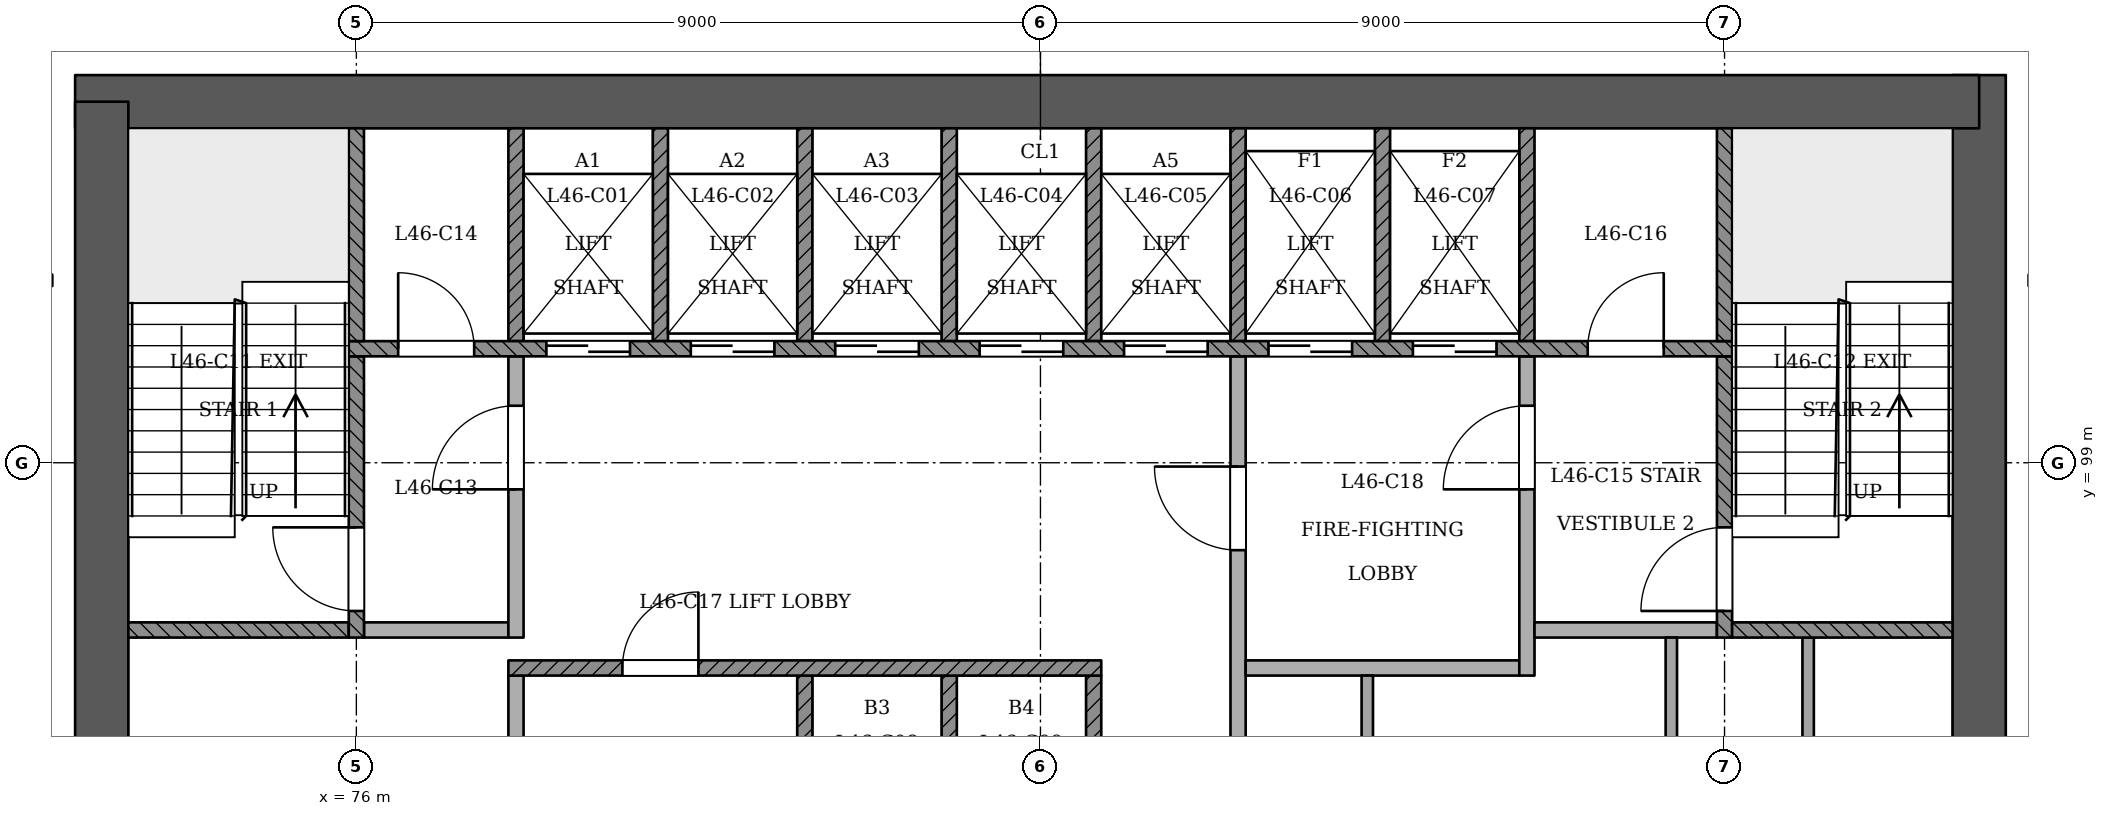
"""IFC4 building model, lengths in metres.
Left out: names, types, materials, properties, quantities, classifications, styles, units other than length and angle.
Written with IfcOpenShell. Run it as: python <this file> out.ifc"""

import sys

from ifc_helpers import new_model, si_unit, direction, frame, frame_2d, origin, place, context, subcontext, project, spatial, rectangle, extrude, element, fill, save


model = new_model("IFC4")
c1 = context("Model", 3, precision=1e-05, world=origin(), true_north=direction((0.0, 1.0)))
c2 = subcontext(c1, "Body", "Model", "MODEL_VIEW")
j1 = project(units=[si_unit("LENGTHUNIT", "METRE"), si_unit("PLANEANGLEUNIT", "RADIAN")], contexts=[c1])
p1 = place(None, origin())
s1 = spatial("IfcSite", under=j1, at=p1, CompositionType="ELEMENT")
p2 = place(p1, origin())
s2 = spatial("IfcBuilding", under=s1, at=p2, CompositionType="ELEMENT")
p3 = place(p2, frame((0.0, 0.0, 178.2)))
s3 = spatial("IfcBuildingStorey", under=s2, at=p3, CompositionType="ELEMENT", Elevation=178.2)
p4 = place(p3, frame((97.35, 93.05, 0.0), z_axis=(0.0, 0.0, 1.0), x_axis=(0.0, 1.0, 0.0)))
e1 = element("IfcWall", 1, at=p4, inside=s3, PredefinedType="SHEAR", context=c2, shape_type="SweptSolid", body=[
    extrude(rectangle(XDim=11.05, YDim=0.7, at=frame_2d((5.525, 0.0))), origin(), (0.0, 0.0, 1.0), 3.6),
])
p5 = place(p3, frame((97.35, 103.75, 0.0), z_axis=(0.0, 0.0, 1.0), x_axis=(-1.0, 0.0, 0.0)))
e2 = element("IfcWall", 2, at=p5, inside=s3, PredefinedType="SHEAR", context=c2, shape_type="SweptSolid", body=[
    extrude(rectangle(XDim=25.05, YDim=0.7, at=frame_2d((12.525, 0.0))), origin(), (0.0, 0.0, 1.0), 3.6),
])
p6 = place(p3, frame((72.65, 103.75, 0.0), z_axis=(0.0, 0.0, 1.0), x_axis=(0.0, -1.0, 0.0)))
e3 = element("IfcWall", 3, at=p6, inside=s3, PredefinedType="SHEAR", context=c2, shape_type="SweptSolid", body=[
    extrude(rectangle(XDim=11.05, YDim=0.7, at=frame_2d((5.525, 0.0))), origin(), (0.0, 0.0, 1.0), 3.6),
])
p7 = place(p3, frame((78.1, 93.4, 0.0), z_axis=(0.0, 0.0, 1.0), x_axis=(0.0, 1.0, 0.0)))
e4 = element("IfcWall", 4, at=p7, inside=s3, PredefinedType="PARTITIONING", context=c2, shape_type="SweptSolid", body=[
    extrude(rectangle(XDim=2.8, YDim=0.2, at=frame_2d((1.4, 0.0))), origin(), (0.0, 0.0, 1.0), 3.15),
])
for number, where, z_axis, x_axis in (
    (5, (81.9, 93.4, 0.0), (0.0, 0.0, 1.0), (0.0, 1.0, 0.0)),
    (6, (83.8, 93.4, 0.0), (0.0, 0.0, 1.0), (0.0, 1.0, 0.0)),
    (7, (85.7, 93.4, 0.0), (0.0, 0.0, 1.0), (0.0, 1.0, 0.0)),
):
    element("IfcWall", number, at=place(p3, frame(where, z_axis=z_axis, x_axis=x_axis)), inside=s3, PredefinedType="SOLIDWALL", context=c2, shape_type="SweptSolid", body=[
        extrude(rectangle(XDim=2.8, YDim=0.2, at=frame_2d((1.4, 0.0))), origin(), (0.0, 0.0, 1.0), 3.15),
    ])
p8 = place(p3, frame((87.6, 93.4, 0.0), z_axis=(0.0, 0.0, 1.0), x_axis=(0.0, 1.0, 0.0)))
e8 = element("IfcWall", 8, at=p8, inside=s3, PredefinedType="PARTITIONING", context=c2, shape_type="SweptSolid", body=[
    extrude(rectangle(XDim=7.0, YDim=0.2, at=frame_2d((3.5, 0.0))), origin(), (0.0, 0.0, 1.0), 3.15),
])
p9 = place(p8, frame((4.45, 0.0, 0.0)))
e9 = element("IfcOpeningElement", 9, at=p9, cuts=e8, PredefinedType="OPENING", context=c2, shape_type="SweptSolid", body=[
    extrude(rectangle(XDim=1.1, YDim=2.1, at=frame_2d((0.55, 1.05))), frame((0.0, 0.11, 0.0), z_axis=(0.0, -1.0, 0.0), x_axis=(1.0, 0.0, 0.0)), (0.0, 0.0, 1.0), 0.221),
])
p10 = place(p3, frame((89.3, 93.4, 0.0), z_axis=(0.0, 0.0, 1.0), x_axis=(0.0, 1.0, 0.0)))
e10 = element("IfcWall", 10, at=p10, inside=s3, PredefinedType="PARTITIONING", context=c2, shape_type="SweptSolid", body=[
    extrude(rectangle(XDim=2.8, YDim=0.15, at=frame_2d((1.4, 0.0))), origin(), (0.0, 0.0, 1.0), 3.15),
])
for number, where, z_axis, x_axis in (
    (11, (93.3, 93.4, 0.0), (0.0, 0.0, 1.0), (0.0, 1.0, 0.0)),
    (12, (95.1, 93.4, 0.0), (0.0, 0.0, 1.0), (0.0, 1.0, 0.0)),
):
    element("IfcWall", number, at=place(p3, frame(where, z_axis=z_axis, x_axis=x_axis)), inside=s3, PredefinedType="PARTITIONING", context=c2, shape_type="SweptSolid", body=[
        extrude(rectangle(XDim=3.3, YDim=0.15, at=frame_2d((1.65, 0.0))), origin(), (0.0, 0.0, 1.0), 3.15),
    ])
p11 = place(p3, frame((78.0, 96.3, 0.0), z_axis=(0.0, 0.0, 1.0), x_axis=(1.0, 0.0, 0.0)))
e13 = element("IfcWall", 13, at=p11, inside=s3, PredefinedType="SOLIDWALL", context=c2, shape_type="SweptSolid", body=[
    extrude(rectangle(XDim=7.8, YDim=0.2, at=frame_2d((3.9, 0.0))), origin(), (0.0, 0.0, 1.0), 3.15),
])
p12 = place(p11, frame((1.5, 0.0, 0.0)))
e14 = element("IfcOpeningElement", 14, at=p12, cuts=e13, PredefinedType="OPENING", context=c2, shape_type="SweptSolid", body=[
    extrude(rectangle(XDim=1.0, YDim=2.1, at=frame_2d((0.5, 1.05))), frame((0.0, 0.11, 0.0), z_axis=(0.0, -1.0, 0.0), x_axis=(1.0, 0.0, 0.0)), (0.0, 0.0, 1.0), 0.221),
])
p13 = place(p3, frame((87.7, 96.3, 0.0), z_axis=(0.0, 0.0, 1.0), x_axis=(1.0, 0.0, 0.0)))
e15 = element("IfcWall", 15, at=p13, inside=s3, PredefinedType="PARTITIONING", context=c2, shape_type="SweptSolid", body=[
    extrude(rectangle(XDim=3.6, YDim=0.2, at=frame_2d((1.8, 0.0))), origin(), (0.0, 0.0, 1.0), 3.15),
])
p14 = place(p3, frame((91.4, 96.2, 0.0), z_axis=(0.0, 0.0, 1.0), x_axis=(0.0, 1.0, 0.0)))
e16 = element("IfcWall", 16, at=p14, inside=s3, PredefinedType="PARTITIONING", context=c2, shape_type="SweptSolid", body=[
    extrude(rectangle(XDim=4.2, YDim=0.2, at=frame_2d((2.1, 0.0))), origin(), (0.0, 0.0, 1.0), 3.15),
])
p15 = place(p14, frame((2.45, 0.0, 0.0)))
e17 = element("IfcOpeningElement", 17, at=p15, cuts=e16, PredefinedType="OPENING", context=c2, shape_type="SweptSolid", body=[
    extrude(rectangle(XDim=1.1, YDim=2.1, at=frame_2d((0.55, 1.05))), frame((0.0, 0.11, 0.0), z_axis=(0.0, -1.0, 0.0), x_axis=(1.0, 0.0, 0.0)), (0.0, 0.0, 1.0), 0.221),
])
p16 = place(p3, frame((73.0, 96.8, 0.0), z_axis=(0.0, 0.0, 1.0), x_axis=(1.0, 0.0, 0.0)))
e18 = element("IfcWall", 18, at=p16, inside=s3, PredefinedType="SOLIDWALL", context=c2, shape_type="SweptSolid", body=[
    extrude(rectangle(XDim=2.9, YDim=0.2, at=frame_2d((1.45, 0.0))), origin(), (0.0, 0.0, 1.0), 3.15),
])
p17 = place(p3, frame((76.0, 96.7, 0.0), z_axis=(0.0, 0.0, 1.0), x_axis=(0.0, 1.0, 0.0)))
e19 = element("IfcWall", 19, at=p17, inside=s3, PredefinedType="SOLIDWALL", context=c2, shape_type="SweptSolid", body=[
    extrude(rectangle(XDim=3.7, YDim=0.2, at=frame_2d((1.85, 0.0))), origin(), (0.0, 0.0, 1.0), 3.15),
])
p18 = place(p17, frame((0.35, 0.0, 0.0)))
e20 = element("IfcOpeningElement", 20, at=p18, cuts=e19, PredefinedType="OPENING", context=c2, shape_type="SweptSolid", body=[
    extrude(rectangle(XDim=1.1, YDim=2.1, at=frame_2d((0.55, 1.05))), frame((0.0, 0.11, 0.0), z_axis=(0.0, -1.0, 0.0), x_axis=(1.0, 0.0, 0.0)), (0.0, 0.0, 1.0), 0.221),
])
p19 = place(p3, frame((76.1, 96.8, 0.0), z_axis=(0.0, 0.0, 1.0), x_axis=(1.0, 0.0, 0.0)))
e21 = element("IfcWall", 21, at=p19, inside=s3, PredefinedType="PARTITIONING", context=c2, shape_type="SweptSolid", body=[
    extrude(rectangle(XDim=1.9, YDim=0.2, at=frame_2d((0.95, 0.0))), origin(), (0.0, 0.0, 1.0), 3.15),
])
p20 = place(p3, frame((78.1, 96.7, 0.0), z_axis=(0.0, 0.0, 1.0), x_axis=(0.0, 1.0, 0.0)))
e22 = element("IfcWall", 22, at=p20, inside=s3, PredefinedType="PARTITIONING", context=c2, shape_type="SweptSolid", body=[
    extrude(rectangle(XDim=3.7, YDim=0.2, at=frame_2d((1.85, 0.0))), origin(), (0.0, 0.0, 1.0), 3.15),
])
p21 = place(p20, frame((1.95, 0.0, 0.0)))
e23 = element("IfcOpeningElement", 23, at=p21, cuts=e22, PredefinedType="OPENING", context=c2, shape_type="SweptSolid", body=[
    extrude(rectangle(XDim=1.1, YDim=2.1, at=frame_2d((0.55, 1.05))), frame((0.0, 0.11, 0.0), z_axis=(0.0, -1.0, 0.0), x_axis=(1.0, 0.0, 0.0)), (0.0, 0.0, 1.0), 0.221),
])
p22 = place(p3, frame((91.5, 96.8, 0.0), z_axis=(0.0, 0.0, 1.0), x_axis=(1.0, 0.0, 0.0)))
e24 = element("IfcWall", 24, at=p22, inside=s3, PredefinedType="PARTITIONING", context=c2, shape_type="SweptSolid", body=[
    extrude(rectangle(XDim=2.4, YDim=0.2, at=frame_2d((1.2, 0.0))), origin(), (0.0, 0.0, 1.0), 3.15),
])
p23 = place(p3, frame((94.0, 96.7, 0.0), z_axis=(0.0, 0.0, 1.0), x_axis=(0.0, 1.0, 0.0)))
e25 = element("IfcWall", 25, at=p23, inside=s3, PredefinedType="SOLIDWALL", context=c2, shape_type="SweptSolid", body=[
    extrude(rectangle(XDim=3.7, YDim=0.2, at=frame_2d((1.85, 0.0))), origin(), (0.0, 0.0, 1.0), 3.15),
])
p24 = place(p23, frame((0.35, 0.0, 0.0)))
e26 = element("IfcOpeningElement", 26, at=p24, cuts=e25, PredefinedType="OPENING", context=c2, shape_type="SweptSolid", body=[
    extrude(rectangle(XDim=1.1, YDim=2.1, at=frame_2d((0.55, 1.05))), frame((0.0, 0.11, 0.0), z_axis=(0.0, -1.0, 0.0), x_axis=(1.0, 0.0, 0.0)), (0.0, 0.0, 1.0), 0.221),
])
p25 = place(p3, frame((94.1, 96.8, 0.0), z_axis=(0.0, 0.0, 1.0), x_axis=(1.0, 0.0, 0.0)))
e27 = element("IfcWall", 27, at=p25, inside=s3, PredefinedType="SOLIDWALL", context=c2, shape_type="SweptSolid", body=[
    extrude(rectangle(XDim=2.9, YDim=0.2, at=frame_2d((1.45, 0.0))), origin(), (0.0, 0.0, 1.0), 3.15),
])
p26 = place(p3, frame((75.9, 100.5, 0.0), z_axis=(0.0, 0.0, 1.0), x_axis=(1.0, 0.0, 0.0)))
e28 = element("IfcWall", 28, at=p26, inside=s3, PredefinedType="SOLIDWALL", context=c2, shape_type="SweptSolid", body=[
    extrude(rectangle(XDim=18.2, YDim=0.2, at=frame_2d((9.1, 0.0))), origin(), (0.0, 0.0, 1.0), 3.15),
])
p27 = place(p26, frame((2.6, 0.0, 0.0)))
e29 = element("IfcOpeningElement", 29, at=p27, cuts=e28, PredefinedType="OPENING", context=c2, shape_type="SweptSolid", body=[
    extrude(rectangle(XDim=1.1, YDim=2.1, at=frame_2d((0.55, 1.05))), frame((0.0, 0.11, 0.0), z_axis=(0.0, -1.0, 0.0), x_axis=(1.0, 0.0, 0.0)), (0.0, 0.0, 1.0), 0.221),
])
p28 = place(p26, frame((4.5, 0.0, 0.0)))
e30 = element("IfcOpeningElement", 30, at=p28, cuts=e28, PredefinedType="OPENING", context=c2, shape_type="SweptSolid", body=[
    extrude(rectangle(XDim=1.1, YDim=2.1, at=frame_2d((0.55, 1.05))), frame((0.0, 0.11, 0.0), z_axis=(0.0, -1.0, 0.0), x_axis=(1.0, 0.0, 0.0)), (0.0, 0.0, 1.0), 0.221),
])
p29 = place(p26, frame((6.4, 0.0, 0.0)))
e31 = element("IfcOpeningElement", 31, at=p29, cuts=e28, PredefinedType="OPENING", context=c2, shape_type="SweptSolid", body=[
    extrude(rectangle(XDim=1.1, YDim=2.1, at=frame_2d((0.55, 1.05))), frame((0.0, 0.11, 0.0), z_axis=(0.0, -1.0, 0.0), x_axis=(1.0, 0.0, 0.0)), (0.0, 0.0, 1.0), 0.221),
])
p30 = place(p26, frame((8.3, 0.0, 0.0)))
e32 = element("IfcOpeningElement", 32, at=p30, cuts=e28, PredefinedType="OPENING", context=c2, shape_type="SweptSolid", body=[
    extrude(rectangle(XDim=1.1, YDim=2.1, at=frame_2d((0.55, 1.05))), frame((0.0, 0.11, 0.0), z_axis=(0.0, -1.0, 0.0), x_axis=(1.0, 0.0, 0.0)), (0.0, 0.0, 1.0), 0.221),
])
p31 = place(p26, frame((10.2, 0.0, 0.0)))
e33 = element("IfcOpeningElement", 33, at=p31, cuts=e28, PredefinedType="OPENING", context=c2, shape_type="SweptSolid", body=[
    extrude(rectangle(XDim=1.1, YDim=2.1, at=frame_2d((0.55, 1.05))), frame((0.0, 0.11, 0.0), z_axis=(0.0, -1.0, 0.0), x_axis=(1.0, 0.0, 0.0)), (0.0, 0.0, 1.0), 0.221),
])
p32 = place(p26, frame((12.1, 0.0, 0.0)))
e34 = element("IfcOpeningElement", 34, at=p32, cuts=e28, PredefinedType="OPENING", context=c2, shape_type="SweptSolid", body=[
    extrude(rectangle(XDim=1.1, YDim=2.1, at=frame_2d((0.55, 1.05))), frame((0.0, 0.11, 0.0), z_axis=(0.0, -1.0, 0.0), x_axis=(1.0, 0.0, 0.0)), (0.0, 0.0, 1.0), 0.221),
])
p33 = place(p26, frame((14.0, 0.0, 0.0)))
e35 = element("IfcOpeningElement", 35, at=p33, cuts=e28, PredefinedType="OPENING", context=c2, shape_type="SweptSolid", body=[
    extrude(rectangle(XDim=1.1, YDim=2.1, at=frame_2d((0.55, 1.05))), frame((0.0, 0.11, 0.0), z_axis=(0.0, -1.0, 0.0), x_axis=(1.0, 0.0, 0.0)), (0.0, 0.0, 1.0), 0.221),
])
p34 = place(p26, frame((0.65, 0.0, 0.0)))
e36 = element("IfcOpeningElement", 36, at=p34, cuts=e28, PredefinedType="OPENING", context=c2, shape_type="SweptSolid", body=[
    extrude(rectangle(XDim=1.0, YDim=2.1, at=frame_2d((0.5, 1.05))), frame((0.0, 0.11, 0.0), z_axis=(0.0, -1.0, 0.0), x_axis=(1.0, 0.0, 0.0)), (0.0, 0.0, 1.0), 0.221),
])
p35 = place(p26, frame((16.3, 0.0, 0.0)))
e37 = element("IfcOpeningElement", 37, at=p35, cuts=e28, PredefinedType="OPENING", context=c2, shape_type="SweptSolid", body=[
    extrude(rectangle(XDim=1.0, YDim=2.1, at=frame_2d((0.5, 1.05))), frame((0.0, 0.11, 0.0), z_axis=(0.0, -1.0, 0.0), x_axis=(1.0, 0.0, 0.0)), (0.0, 0.0, 1.0), 0.221),
])
for number, where, z_axis, x_axis in (
    (38, (76.0, 100.6, 0.0), (0.0, 0.0, 1.0), (0.0, 1.0, 0.0)),
    (39, (78.1, 100.6, 0.0), (0.0, 0.0, 1.0), (0.0, 1.0, 0.0)),
    (40, (80.0, 100.6, 0.0), (0.0, 0.0, 1.0), (0.0, 1.0, 0.0)),
    (41, (81.9, 100.6, 0.0), (0.0, 0.0, 1.0), (0.0, 1.0, 0.0)),
    (42, (83.8, 100.6, 0.0), (0.0, 0.0, 1.0), (0.0, 1.0, 0.0)),
    (43, (85.7, 100.6, 0.0), (0.0, 0.0, 1.0), (0.0, 1.0, 0.0)),
    (44, (87.6, 100.6, 0.0), (0.0, 0.0, 1.0), (0.0, 1.0, 0.0)),
    (45, (89.5, 100.6, 0.0), (0.0, 0.0, 1.0), (0.0, 1.0, 0.0)),
    (46, (91.4, 100.6, 0.0), (0.0, 0.0, 1.0), (0.0, 1.0, 0.0)),
    (47, (94.0, 100.6, 0.0), (0.0, 0.0, 1.0), (0.0, 1.0, 0.0)),
):
    element("IfcWall", number, at=place(p3, frame(where, z_axis=z_axis, x_axis=x_axis)), inside=s3, PredefinedType="SOLIDWALL", context=c2, shape_type="SweptSolid", body=[
        extrude(rectangle(XDim=2.8, YDim=0.2, at=frame_2d((1.4, 0.0))), origin(), (0.0, 0.0, 1.0), 3.15),
    ])
p36 = place(p27, origin())
e48 = element("IfcDoor", 48, at=p36, inside=s3, OperationType="SLIDING_TO_RIGHT", PredefinedType="NOTDEFINED", context=c2, shape_type="SweptSolid", body=[
    extrude(rectangle(XDim=1.1, YDim=2.1, at=frame_2d((0.55, 1.05))), frame((0.0, 0.025, 0.0), z_axis=(0.0, -1.0, 0.0), x_axis=(1.0, 0.0, 0.0)), (0.0, 0.0, 1.0), 0.05),
])
fill(e29, e48)
p37 = place(p28, origin())
e49 = element("IfcDoor", 49, at=p37, inside=s3, OperationType="SLIDING_TO_LEFT", PredefinedType="NOTDEFINED", context=c2, shape_type="SweptSolid", body=[
    extrude(rectangle(XDim=1.1, YDim=2.1, at=frame_2d((0.55, 1.05))), frame((0.0, 0.025, 0.0), z_axis=(0.0, -1.0, 0.0), x_axis=(1.0, 0.0, 0.0)), (0.0, 0.0, 1.0), 0.05),
])
fill(e30, e49)
p38 = place(p29, origin())
e50 = element("IfcDoor", 50, at=p38, inside=s3, OperationType="SLIDING_TO_RIGHT", PredefinedType="NOTDEFINED", context=c2, shape_type="SweptSolid", body=[
    extrude(rectangle(XDim=1.1, YDim=2.1, at=frame_2d((0.55, 1.05))), frame((0.0, 0.025, 0.0), z_axis=(0.0, -1.0, 0.0), x_axis=(1.0, 0.0, 0.0)), (0.0, 0.0, 1.0), 0.05),
])
fill(e31, e50)
p39 = place(p30, origin())
e51 = element("IfcDoor", 51, at=p39, inside=s3, OperationType="SLIDING_TO_LEFT", PredefinedType="NOTDEFINED", context=c2, shape_type="SweptSolid", body=[
    extrude(rectangle(XDim=1.1, YDim=2.1, at=frame_2d((0.55, 1.05))), frame((0.0, 0.025, 0.0), z_axis=(0.0, -1.0, 0.0), x_axis=(1.0, 0.0, 0.0)), (0.0, 0.0, 1.0), 0.05),
])
fill(e32, e51)
p40 = place(p31, origin())
e52 = element("IfcDoor", 52, at=p40, inside=s3, OperationType="SLIDING_TO_RIGHT", PredefinedType="NOTDEFINED", context=c2, shape_type="SweptSolid", body=[
    extrude(rectangle(XDim=1.1, YDim=2.1, at=frame_2d((0.55, 1.05))), frame((0.0, 0.025, 0.0), z_axis=(0.0, -1.0, 0.0), x_axis=(1.0, 0.0, 0.0)), (0.0, 0.0, 1.0), 0.05),
])
fill(e33, e52)
p41 = place(p32, origin())
e53 = element("IfcDoor", 53, at=p41, inside=s3, OperationType="SLIDING_TO_RIGHT", PredefinedType="NOTDEFINED", context=c2, shape_type="SweptSolid", body=[
    extrude(rectangle(XDim=1.1, YDim=2.1, at=frame_2d((0.55, 1.05))), frame((0.0, 0.025, 0.0), z_axis=(0.0, -1.0, 0.0), x_axis=(1.0, 0.0, 0.0)), (0.0, 0.0, 1.0), 0.05),
])
fill(e34, e53)
p42 = place(p33, origin())
e54 = element("IfcDoor", 54, at=p42, inside=s3, OperationType="SLIDING_TO_LEFT", PredefinedType="NOTDEFINED", context=c2, shape_type="SweptSolid", body=[
    extrude(rectangle(XDim=1.1, YDim=2.1, at=frame_2d((0.55, 1.05))), frame((0.0, 0.025, 0.0), z_axis=(0.0, -1.0, 0.0), x_axis=(1.0, 0.0, 0.0)), (0.0, 0.0, 1.0), 0.05),
])
fill(e35, e54)
p43 = place(p18, origin())
e55 = element("IfcDoor", 55, at=p43, inside=s3, OperationType="SINGLE_SWING_RIGHT", PredefinedType="NOTDEFINED", context=c2, shape_type="SweptSolid", body=[
    extrude(rectangle(XDim=1.1, YDim=2.1, at=frame_2d((0.55, 1.05))), frame((0.0, 0.025, 0.0), z_axis=(0.0, -1.0, 0.0), x_axis=(1.0, 0.0, 0.0)), (0.0, 0.0, 1.0), 0.05),
])
fill(e20, e55)
p44 = place(p24, origin())
e56 = element("IfcDoor", 56, at=p44, inside=s3, OperationType="SINGLE_SWING_LEFT", PredefinedType="NOTDEFINED", context=c2, shape_type="SweptSolid", body=[
    extrude(rectangle(XDim=1.1, YDim=2.1, at=frame_2d((0.55, 1.05))), frame((0.0, 0.025, 0.0), z_axis=(0.0, -1.0, 0.0), x_axis=(1.0, 0.0, 0.0)), (0.0, 0.0, 1.0), 0.05),
])
fill(e26, e56)
p45 = place(p21, origin())
e57 = element("IfcDoor", 57, at=p45, inside=s3, OperationType="SINGLE_SWING_LEFT", PredefinedType="NOTDEFINED", context=c2, shape_type="SweptSolid", body=[
    extrude(rectangle(XDim=1.1, YDim=2.1, at=frame_2d((0.55, 1.05))), frame((0.0, 0.025, 0.0), z_axis=(0.0, -1.0, 0.0), x_axis=(1.0, 0.0, 0.0)), (0.0, 0.0, 1.0), 0.05),
])
fill(e23, e57)
p46 = place(p9, origin())
e58 = element("IfcDoor", 58, at=p46, inside=s3, OperationType="SINGLE_SWING_RIGHT", PredefinedType="NOTDEFINED", context=c2, shape_type="SweptSolid", body=[
    extrude(rectangle(XDim=1.1, YDim=2.1, at=frame_2d((0.55, 1.05))), frame((0.0, 0.025, 0.0), z_axis=(0.0, -1.0, 0.0), x_axis=(1.0, 0.0, 0.0)), (0.0, 0.0, 1.0), 0.05),
])
fill(e9, e58)
p47 = place(p15, origin())
e59 = element("IfcDoor", 59, at=p47, inside=s3, OperationType="SINGLE_SWING_LEFT", PredefinedType="NOTDEFINED", context=c2, shape_type="SweptSolid", body=[
    extrude(rectangle(XDim=1.1, YDim=2.1, at=frame_2d((0.55, 1.05))), frame((0.0, 0.025, 0.0), z_axis=(0.0, -1.0, 0.0), x_axis=(1.0, 0.0, 0.0)), (0.0, 0.0, 1.0), 0.05),
])
fill(e17, e59)
p48 = place(p34, origin())
e60 = element("IfcDoor", 60, at=p48, inside=s3, OperationType="SINGLE_SWING_LEFT", PredefinedType="NOTDEFINED", context=c2, shape_type="SweptSolid", body=[
    extrude(rectangle(XDim=1.0, YDim=2.1, at=frame_2d((0.5, 1.05))), frame((0.0, 0.025, 0.0), z_axis=(0.0, -1.0, 0.0), x_axis=(1.0, 0.0, 0.0)), (0.0, 0.0, 1.0), 0.05),
])
fill(e36, e60)
p49 = place(p35, origin())
e61 = element("IfcDoor", 61, at=p49, inside=s3, OperationType="SINGLE_SWING_RIGHT", PredefinedType="NOTDEFINED", context=c2, shape_type="SweptSolid", body=[
    extrude(rectangle(XDim=1.0, YDim=2.1, at=frame_2d((0.5, 1.05))), frame((0.0, 0.025, 0.0), z_axis=(0.0, -1.0, 0.0), x_axis=(1.0, 0.0, 0.0)), (0.0, 0.0, 1.0), 0.05),
])
fill(e37, e61)
p50 = place(p12, origin())
e62 = element("IfcDoor", 62, at=p50, inside=s3, OperationType="SINGLE_SWING_RIGHT", PredefinedType="NOTDEFINED", context=c2, shape_type="SweptSolid", body=[
    extrude(rectangle(XDim=1.0, YDim=2.1, at=frame_2d((0.5, 1.05))), frame((0.0, 0.025, 0.0), z_axis=(0.0, -1.0, 0.0), x_axis=(1.0, 0.0, 0.0)), (0.0, 0.0, 1.0), 0.05),
])
fill(e14, e62)
save(model, sys.argv[1])
